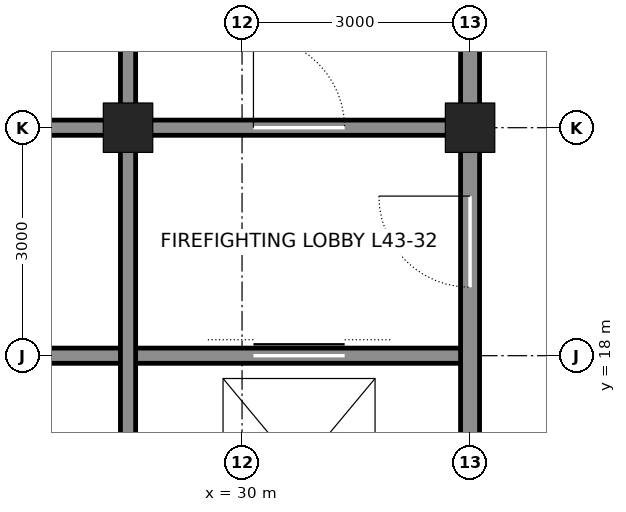
"""IFC4 building model, lengths in metres.
Left out: names, types, materials, properties, quantities, classifications, styles, units other than length and angle.
Written with IfcOpenShell. Run it as: python <this file> out.ifc"""

import sys

from ifc_helpers import new_model, si_unit, direction, frame, frame_2d, origin, origin_2d, place, context, subcontext, project, spatial, rectangle, hollow_rectangle, extrude, element, fill, save


model = new_model("IFC4")
c1 = context("Model", 3, precision=1e-05, world=origin(), true_north=direction((0.0, 1.0)))
c2 = subcontext(c1, "Body", "Model", "MODEL_VIEW")
j1 = project(units=[si_unit("LENGTHUNIT", "METRE"), si_unit("PLANEANGLEUNIT", "RADIAN")], contexts=[c1])
p1 = place(None, origin())
s1 = spatial("IfcSite", under=j1, at=p1, CompositionType="ELEMENT")
p2 = place(p1, origin())
s2 = spatial("IfcBuilding", under=s1, at=p2, CompositionType="ELEMENT")
p3 = place(p2, frame((0.0, 0.0, 197.1)))
s3 = spatial("IfcBuildingStorey", under=s2, at=p3, CompositionType="ELEMENT", Elevation=197.1)
for number, where, z_axis, x_axis in (
    (1, (33.0, 21.0, 0.0), (0.0, 0.0, 1.0), (1.0, 0.0, 0.0)),
    (2, (28.5, 21.0, 0.0), (0.0, 0.0, 1.0), (1.0, 0.0, 0.0)),
):
    element("IfcColumn", number, at=place(p3, frame(where, z_axis=z_axis, x_axis=x_axis)), inside=s3, PredefinedType="COLUMN", context=c2, shape_type="SweptSolid", body=[
        extrude(hollow_rectangle(XDim=0.65, YDim=0.65, WallThickness=0.065, at=origin_2d()), origin(), (0.0, 0.0, 1.0), 4.2),
    ])
p4 = place(p3, frame((25.5, 18.0, 0.0), z_axis=(0.0, 0.0, 1.0), x_axis=(1.0, 0.0, 0.0)))
e3 = element("IfcWall", 3, at=p4, inside=s3, PredefinedType="SOLIDWALL", context=c2, shape_type="SweptSolid", body=[
    extrude(rectangle(XDim=7.5, YDim=0.2, at=frame_2d((3.75, 0.0))), origin(), (0.0, 0.0, 1.0), 4.04),
])
p5 = place(p4, frame((4.65, 0.0, 0.0)))
e4 = element("IfcOpeningElement", 4, at=p5, cuts=e3, PredefinedType="OPENING", context=c2, shape_type="SweptSolid", body=[
    extrude(rectangle(XDim=1.2, YDim=2.1, at=frame_2d((0.6, 1.05))), frame((0.0, 0.11, 0.0), z_axis=(0.0, -1.0, 0.0), x_axis=(1.0, 0.0, 0.0)), (0.0, 0.0, 1.0), 0.22),
])
p6 = place(p3, frame((25.5, 21.0, 0.0), z_axis=(0.0, 0.0, 1.0), x_axis=(1.0, 0.0, 0.0)))
e5 = element("IfcWall", 5, at=p6, inside=s3, PredefinedType="SOLIDWALL", context=c2, shape_type="SweptSolid", body=[
    extrude(rectangle(XDim=2.75, YDim=0.2, at=frame_2d((1.375, 0.0))), origin(), (0.0, 0.0, 1.0), 3.09),
])
p7 = place(p3, frame((28.75, 21.0, 0.0), z_axis=(0.0, 0.0, 1.0), x_axis=(1.0, 0.0, 0.0)))
e6 = element("IfcWall", 6, at=p7, inside=s3, PredefinedType="SOLIDWALL", context=c2, shape_type="SweptSolid", body=[
    extrude(rectangle(XDim=4.0, YDim=0.2, at=frame_2d((2.0, 0.0))), origin(), (0.0, 0.0, 1.0), 3.09),
])
p8 = place(p7, frame((1.4, 0.0, 0.0)))
e7 = element("IfcOpeningElement", 7, at=p8, cuts=e6, PredefinedType="OPENING", context=c2, shape_type="SweptSolid", body=[
    extrude(rectangle(XDim=1.2, YDim=2.1, at=frame_2d((0.6, 1.05))), frame((0.0, 0.11, 0.0), z_axis=(0.0, -1.0, 0.0), x_axis=(1.0, 0.0, 0.0)), (0.0, 0.0, 1.0), 0.22),
])
p9 = place(p3, frame((28.5, 12.25, 0.0), z_axis=(0.0, 0.0, 1.0), x_axis=(0.0, 1.0, 0.0)))
e8 = element("IfcWall", 8, at=p9, inside=s3, PredefinedType="SOLIDWALL", context=c2, shape_type="SweptSolid", body=[
    extrude(rectangle(XDim=8.5, YDim=0.2, at=frame_2d((4.25, 0.0))), origin(), (0.0, 0.0, 1.0), 3.113),
])
p10 = place(p3, frame((28.5, 21.25, 0.0), z_axis=(0.0, 0.0, 1.0), x_axis=(0.0, 1.0, 0.0)))
e9 = element("IfcWall", 9, at=p10, inside=s3, PredefinedType="SOLIDWALL", context=c2, shape_type="SweptSolid", body=[
    extrude(rectangle(XDim=2.5, YDim=0.2, at=frame_2d((1.25, 0.0))), origin(), (0.0, 0.0, 1.0), 3.113),
])
p11 = place(p3, frame((33.0, 12.25, 0.0), z_axis=(0.0, 0.0, 1.0), x_axis=(0.0, 1.0, 0.0)))
e10 = element("IfcWall", 10, at=p11, inside=s3, PredefinedType="SOLIDWALL", context=c2, shape_type="SweptSolid", body=[
    extrude(rectangle(XDim=8.5, YDim=0.25, at=frame_2d((4.25, 0.0))), origin(), (0.0, 0.0, 1.0), 3.113),
])
p12 = place(p11, frame((6.65, 0.0, 0.0)))
e11 = element("IfcOpeningElement", 11, at=p12, cuts=e10, PredefinedType="OPENING", context=c2, shape_type="SweptSolid", body=[
    extrude(rectangle(XDim=1.2, YDim=2.1, at=frame_2d((0.6, 1.05))), frame((0.0, 0.135, 0.0), z_axis=(0.0, -1.0, 0.0), x_axis=(1.0, 0.0, 0.0)), (0.0, 0.0, 1.0), 0.27),
])
p13 = place(p11, frame((0.875, 0.0, 0.0)))
e12 = element("IfcOpeningElement", 12, at=p13, cuts=e10, PredefinedType="OPENING", context=c2, shape_type="SweptSolid", body=[
    extrude(rectangle(XDim=0.75, YDim=2.1, at=frame_2d((0.375, 1.05))), frame((0.0, 0.135, 0.0), z_axis=(0.0, -1.0, 0.0), x_axis=(1.0, 0.0, 0.0)), (0.0, 0.0, 1.0), 0.27),
])
p14 = place(p3, frame((33.0, 21.25, 0.0), z_axis=(0.0, 0.0, 1.0), x_axis=(0.0, 1.0, 0.0)))
e13 = element("IfcWall", 13, at=p14, inside=s3, PredefinedType="SOLIDWALL", context=c2, shape_type="SweptSolid", body=[
    extrude(rectangle(XDim=2.5, YDim=0.25, at=frame_2d((1.25, 0.0))), origin(), (0.0, 0.0, 1.0), 3.113),
])
p15 = place(p8, origin())
e14 = element("IfcDoor", 14, at=p15, inside=s3, OperationType="SINGLE_SWING_LEFT", PredefinedType="DOOR", context=c2, shape_type="SweptSolid", body=[
    extrude(rectangle(XDim=1.2, YDim=2.1, at=frame_2d((0.6, 1.05))), frame((0.0, 0.025, 0.0), z_axis=(0.0, -1.0, 0.0), x_axis=(1.0, 0.0, 0.0)), (0.0, 0.0, 1.0), 0.05),
])
fill(e7, e14)
p16 = place(p12, origin())
e15 = element("IfcDoor", 15, at=p16, inside=s3, OperationType="SINGLE_SWING_RIGHT", PredefinedType="DOOR", context=c2, shape_type="SweptSolid", body=[
    extrude(rectangle(XDim=1.2, YDim=2.1, at=frame_2d((0.6, 1.05))), frame((0.0, 0.025, 0.0), z_axis=(0.0, -1.0, 0.0), x_axis=(1.0, 0.0, 0.0)), (0.0, 0.0, 1.0), 0.05),
])
fill(e11, e15)
p17 = place(p5, origin())
e16 = element("IfcDoor", 16, at=p17, inside=s3, OperationType="DOUBLE_DOOR_SLIDING", PredefinedType="DOOR", context=c2, shape_type="SweptSolid", body=[
    extrude(rectangle(XDim=1.2, YDim=2.1, at=frame_2d((0.6, 1.05))), frame((0.0, 0.025, 0.0), z_axis=(0.0, -1.0, 0.0), x_axis=(1.0, 0.0, 0.0)), (0.0, 0.0, 1.0), 0.05),
])
fill(e4, e16)
save(model, sys.argv[1])
